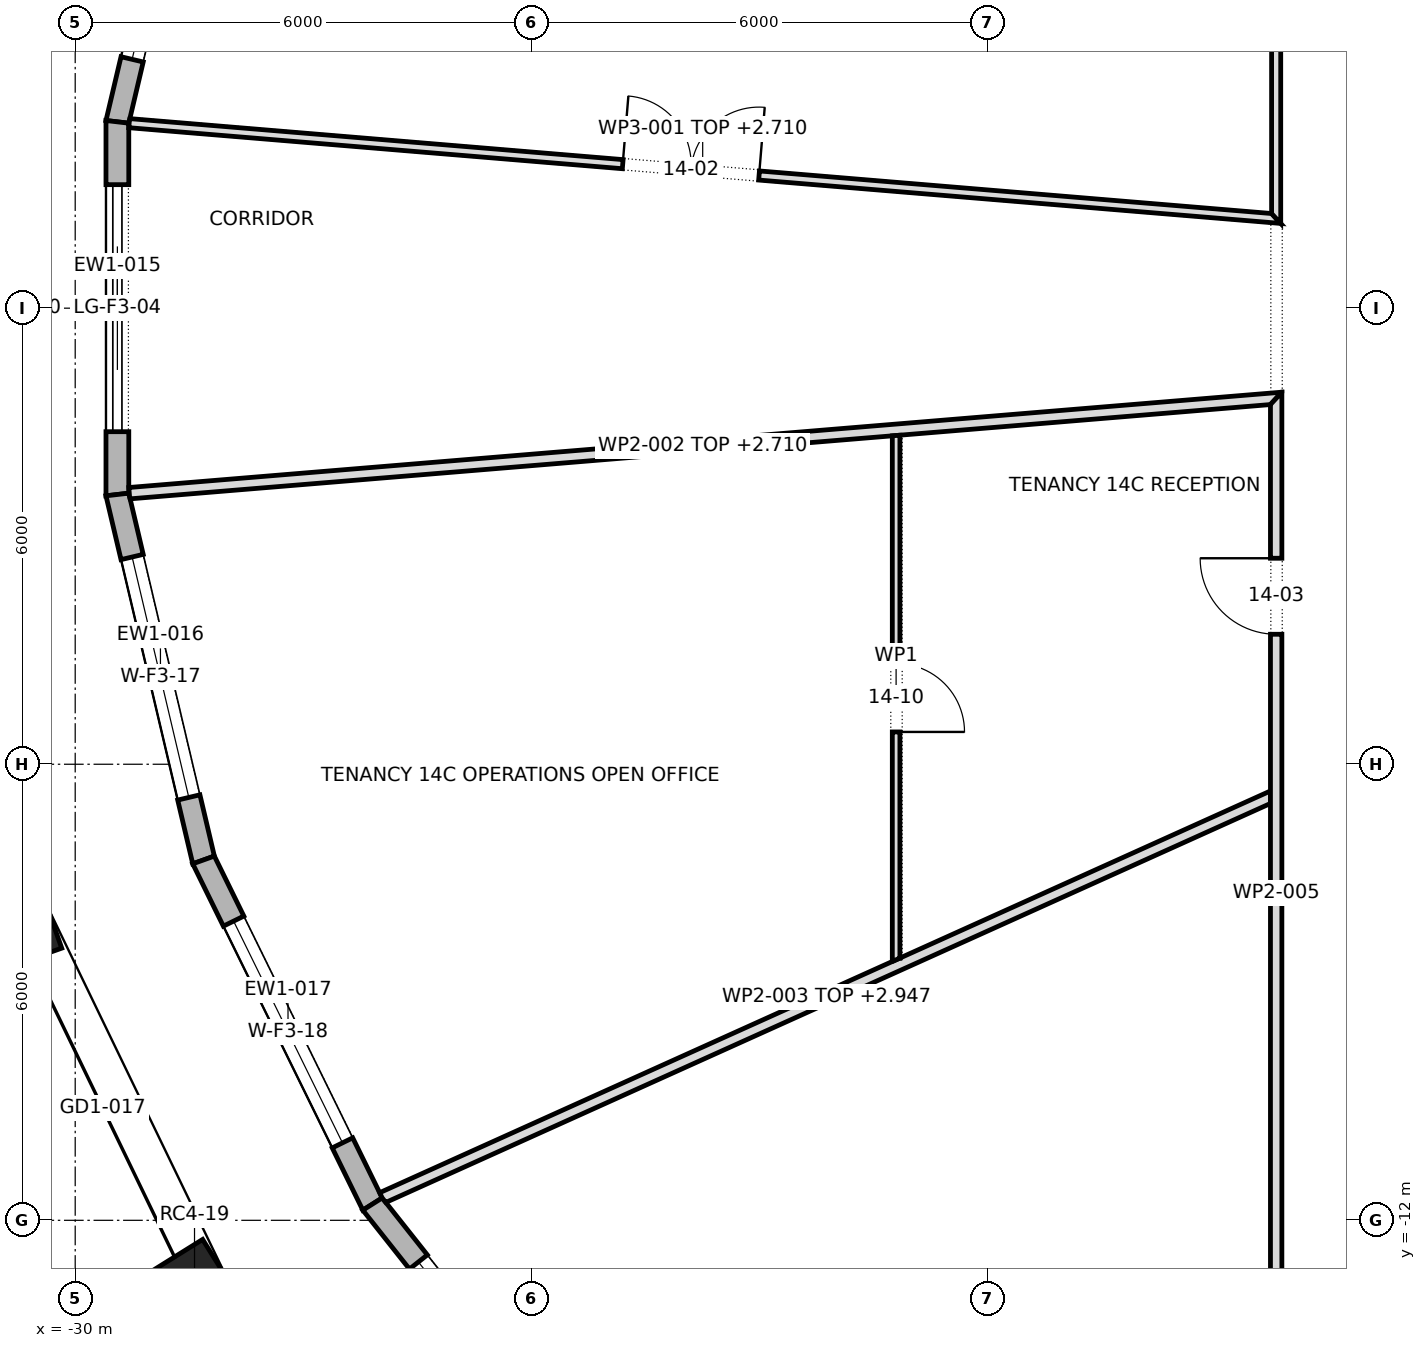
"""IFC4 building model, lengths in metres.
Left out: names, types, materials, properties, quantities, classifications, styles, units other than length and angle.
Written with IfcOpenShell. Run it as: python <this file> out.ifc"""

import sys

from ifc_helpers import new_model, si_unit, direction, frame, frame_2d, origin, origin_2d, place, context, subcontext, project, spatial, polyline, rectangle, outline, extrude, element, fill, save


model = new_model("IFC4")
c1 = context("Model", 3, precision=1e-05, world=origin(), true_north=direction((0.0, 1.0)))
c2 = subcontext(c1, "Body", "Model", "MODEL_VIEW")
j1 = project(units=[si_unit("LENGTHUNIT", "METRE"), si_unit("PLANEANGLEUNIT", "RADIAN")], contexts=[c1])
p1 = place(None, origin())
s1 = spatial("IfcSite", under=j1, at=p1, CompositionType="ELEMENT")
p2 = place(p1, origin())
s2 = spatial("IfcBuilding", under=s1, at=p2, CompositionType="ELEMENT")
p3 = place(p2, frame((0.0, 0.0, 202.9)))
s3 = spatial("IfcBuildingStorey", under=s2, at=p3, CompositionType="ELEMENT", Elevation=202.9)
for number, where, z_axis, x_axis in (
    (1, (-30.849, -8.021, 0.0), (0.0, 0.0, 1.0), (0.334, -0.943, 0.0)),
    (2, (-28.43, -13.025, 0.0), (0.0, 0.0, 1.0), (0.529, -0.849, 0.0)),
):
    element("IfcColumn", number, at=place(p3, frame(where, z_axis=z_axis, x_axis=x_axis)), inside=s3, PredefinedType="COLUMN", context=c2, shape_type="SweptSolid", body=[
        extrude(rectangle(XDim=1.2, YDim=1.0, at=origin_2d()), origin(), (0.0, 0.0, 1.0), 4.0),
    ])
p4 = place(p3, frame((-28.311, 7.259, 0.0), z_axis=(0.0, 0.0, 1.0), x_axis=(-0.229535186351, -0.973300363828, 0.0)))
e3 = element("IfcWall", 3, at=p4, inside=s3, PredefinedType="STANDARD", context=c2, shape_type="SweptSolid", body=[
    extrude(outline(polyline([(-0.017, -0.15), (4.957, -0.15), (4.922, 0.15), (0.017, 0.15), (-0.017, -0.15)])), origin(), (0.0, 0.0, 1.0), 3.7),
])
p5 = place(p4, frame((0.845, 0.0, 0.6)))
e4 = element("IfcOpeningElement", 4, at=p5, cuts=e3, PredefinedType="OPENING", context=c2, shape_type="SweptSolid", body=[
    extrude(rectangle(XDim=3.25, YDim=2.65, at=frame_2d((1.625, 1.325))), frame((0.0, 0.162, 0.0), z_axis=(0.0, -1.0, 0.0), x_axis=(1.0, 0.0, 0.0)), (0.0, 0.0, 1.0), 0.324),
])
p6 = place(p3, frame((-29.445, 2.451, 0.0), z_axis=(0.0, 0.0, 1.0), x_axis=(0.0, -1.0, 0.0)))
e5 = element("IfcWall", 5, at=p6, inside=s3, PredefinedType="STANDARD", context=c2, shape_type="SweptSolid", body=[
    extrude(outline(polyline([(-0.017, -0.15), (4.92, -0.15), (4.885, 0.15), (0.017, 0.15), (-0.017, -0.15)])), origin(), (0.0, 0.0, 1.0), 3.7),
])
p7 = place(p6, frame((0.826, 0.0, 0.0)))
e6 = element("IfcOpeningElement", 6, at=p7, cuts=e5, PredefinedType="OPENING", context=c2, shape_type="SweptSolid", body=[
    extrude(rectangle(XDim=3.25, YDim=3.25, at=frame_2d((1.625, 1.625))), frame((0.0, 0.162, 0.0), z_axis=(0.0, -1.0, 0.0), x_axis=(1.0, 0.0, 0.0)), (0.0, 0.0, 1.0), 0.324),
])
p8 = place(p3, frame((-29.445, -2.451, 0.0), z_axis=(0.0, 0.0, 1.0), x_axis=(0.229535186351, -0.973300363828, 0.0)))
e7 = element("IfcWall", 7, at=p8, inside=s3, PredefinedType="STANDARD", context=c2, shape_type="SweptSolid", body=[
    extrude(outline(polyline([(-0.017, -0.15), (4.956, -0.15), (4.923, 0.15), (0.017, 0.15), (-0.017, -0.15)])), origin(), (0.0, 0.0, 1.0), 3.7),
])
p9 = place(p8, frame((0.845, 0.0, 0.6)))
e8 = element("IfcOpeningElement", 8, at=p9, cuts=e7, PredefinedType="OPENING", context=c2, shape_type="SweptSolid", body=[
    extrude(rectangle(XDim=3.25, YDim=2.65, at=frame_2d((1.625, 1.325))), frame((0.0, 0.162, 0.0), z_axis=(0.0, -1.0, 0.0), x_axis=(1.0, 0.0, 0.0)), (0.0, 0.0, 1.0), 0.324),
])
p10 = place(p3, frame((-28.311, -7.259, 0.0), z_axis=(0.0, 0.0, 1.0), x_axis=(0.440773193145, -0.89761851151, 0.0)))
e9 = element("IfcWall", 9, at=p10, inside=s3, PredefinedType="STANDARD", context=c2, shape_type="SweptSolid", body=[
    extrude(outline(polyline([(-0.017, -0.15), (5.059, -0.15), (5.027, 0.15), (0.017, 0.15), (-0.017, -0.15)])), origin(), (0.0, 0.0, 1.0), 3.7),
])
p11 = place(p10, frame((0.896, 0.0, 0.6)))
e10 = element("IfcOpeningElement", 10, at=p11, cuts=e9, PredefinedType="OPENING", context=c2, shape_type="SweptSolid", body=[
    extrude(rectangle(XDim=3.25, YDim=2.65, at=frame_2d((1.625, 1.325))), frame((0.0, 0.162, 0.0), z_axis=(0.0, -1.0, 0.0), x_axis=(1.0, 0.0, 0.0)), (0.0, 0.0, 1.0), 0.324),
])
p12 = place(p3, frame((-26.088, -11.786, 0.0), z_axis=(0.0, 0.0, 1.0), x_axis=(0.620870264345, -0.783913333763, 0.0)))
e11 = element("IfcWall", 11, at=p12, inside=s3, PredefinedType="STANDARD", context=c2, shape_type="SweptSolid", body=[
    extrude(outline(polyline([(-0.016, -0.15), (5.21, -0.15), (5.179, 0.15), (0.016, 0.15), (-0.016, -0.15)])), origin(), (0.0, 0.0, 1.0), 3.7),
])
p13 = place(p12, frame((0.972, 0.0, 0.6)))
e12 = element("IfcOpeningElement", 12, at=p13, cuts=e11, PredefinedType="OPENING", context=c2, shape_type="SweptSolid", body=[
    extrude(rectangle(XDim=3.25, YDim=2.65, at=frame_2d((1.625, 1.325))), frame((0.0, 0.162, 0.0), z_axis=(0.0, -1.0, 0.0), x_axis=(1.0, 0.0, 0.0)), (0.0, 0.0, 1.0), 0.324),
])
p14 = place(p3, frame((-29.29, 2.434, 0.0), z_axis=(0.0, 0.0, 1.0), x_axis=(0.996564113419, -0.082824922852, 0.0)))
e13 = element("IfcWall", 13, at=p14, inside=s3, PredefinedType="PARTITIONING", context=c2, shape_type="SweptSolid", body=[
    extrude(outline(polyline([(15.207, -0.06), (15.207, -0.06), (15.207, -0.06), (15.207, -0.06), (15.142, 0.0), (15.077, 0.06), (13.192, 0.06), (11.308, 0.06), (9.424, 0.06), (7.54, 0.06), (5.656, 0.06), (3.772, 0.06), (1.888, 0.06), (0.004, 0.06), (0.0, 0.035), (0.0, -0.06), (1.901, -0.06), (3.802, -0.06), (5.703, -0.06), (7.604, -0.06), (9.504, -0.06), (11.405, -0.06), (13.306, -0.06), (15.207, -0.06)])), origin(), (0.0, 0.0, 1.0), 2.71),
])
p15 = place(p14, frame((6.515, 0.0, 0.0)))
e14 = element("IfcOpeningElement", 14, at=p15, cuts=e13, PredefinedType="OPENING", context=c2, shape_type="SweptSolid", body=[
    extrude(rectangle(XDim=1.8, YDim=2.1, at=frame_2d((0.9, 1.05))), frame((0.0, 0.072, 0.0), z_axis=(0.0, -1.0, 0.0), x_axis=(1.0, 0.0, 0.0)), (0.0, 0.0, 1.0), 0.144),
])
p16 = place(p3, frame((-29.288, -2.434, 0.0), z_axis=(0.0, 0.0, 1.0), x_axis=(0.9965984313, 0.082410962436, 0.0)))
e15 = element("IfcWall", 15, at=p16, inside=s3, PredefinedType="PARTITIONING", context=c2, shape_type="SweptSolid", body=[
    extrude(outline(polyline([(0.005, -0.075), (1.886, -0.075), (3.768, -0.075), (5.65, -0.075), (7.531, -0.075), (9.413, -0.075), (11.295, -0.075), (13.177, -0.075), (15.059, -0.075), (15.221, 0.075), (15.221, 0.075), (13.319, 0.075), (11.416, 0.075), (9.513, 0.075), (7.611, 0.075), (5.708, 0.075), (3.805, 0.075), (1.903, 0.075), (0.0, 0.075), (0.0, -0.044), (0.005, -0.075)])), origin(), (0.0, 0.0, 1.0), 2.71),
])
p17 = place(p3, frame((-25.963, -11.705, 0.0), z_axis=(0.0, 0.0, 1.0), x_axis=(0.911586477794, 0.41110837197, 0.0)))
e16 = element("IfcWall", 16, at=p17, inside=s3, PredefinedType="PARTITIONING", context=c2, shape_type="SweptSolid", body=[
    extrude(outline(polyline([(0.021, -0.075), (1.844, -0.075), (3.668, -0.075), (5.492, -0.075), (7.316, -0.075), (9.14, -0.075), (10.964, -0.075), (12.788, -0.075), (12.856, 0.075), (11.073, 0.075), (9.291, 0.075), (7.508, 0.075), (7.507, 0.073), (7.502, 0.075), (5.627, 0.075), (3.751, 0.075), (1.875, 0.075), (0.0, 0.075), (0.0, 0.062), (0.002, -0.001), (0.021, -0.075)])), origin(), (0.0, 0.0, 1.0), 2.947),
])
p18 = place(p3, frame((-19.2, -8.595, 0.0), z_axis=(0.0, 0.0, 1.0), x_axis=(0.0, 1.0, 0.0)))
e17 = element("IfcWall", 17, at=p18, inside=s3, PredefinedType="PARTITIONING", context=c2, shape_type="SweptSolid", body=[
    extrude(outline(polyline([(6.924, -0.05), (6.924, -0.047), (6.916, 0.05), (5.187, 0.05), (3.458, 0.05), (1.729, 0.05), (0.0, 0.05), (0.0, 0.05), (0.045, -0.05), (1.765, -0.05), (3.484, -0.05), (5.204, -0.05), (6.924, -0.05)])), origin(), (0.0, 0.0, 1.0), 3.7),
])
p19 = place(p18, frame((3.02, 0.0, 0.0)))
e18 = element("IfcOpeningElement", 18, at=p19, cuts=e17, PredefinedType="OPENING", context=c2, shape_type="SweptSolid", body=[
    extrude(rectangle(XDim=0.9, YDim=2.1, at=frame_2d((0.45, 1.05))), frame((0.0, 0.062, 0.0), z_axis=(0.0, -1.0, 0.0), x_axis=(1.0, 0.0, 0.0)), (0.0, 0.0, 1.0), 0.124),
])
p20 = place(p3, frame((-14.2, -14.275, 0.0), z_axis=(0.0, 0.0, 1.0), x_axis=(0.0, 1.0, 0.0)))
e19 = element("IfcWall", 19, at=p20, inside=s3, PredefinedType="PARTITIONING", context=c2, shape_type="SweptSolid", body=[
    extrude(outline(polyline([(0.15, -0.075), (2.01, -0.075), (3.87, -0.075), (5.73, -0.075), (7.59, -0.075), (9.45, -0.075), (11.31, -0.075), (13.17, -0.075), (13.007, 0.075), (11.149, 0.075), (9.291, 0.075), (7.433, 0.075), (5.574, 0.075), (3.716, 0.075), (1.858, 0.075), (0.0, 0.075), (0.15, -0.075)])), origin(), (0.0, 0.0, 1.0), 3.7),
])
p21 = place(p20, frame((9.985, 0.0, 0.0)))
e20 = element("IfcOpeningElement", 20, at=p21, cuts=e19, PredefinedType="OPENING", context=c2, shape_type="SweptSolid", body=[
    extrude(rectangle(XDim=1.0, YDim=2.1, at=frame_2d((0.5, 1.05))), frame((0.0, 0.087, 0.0), z_axis=(0.0, -1.0, 0.0), x_axis=(1.0, 0.0, 0.0)), (0.0, 0.0, 1.0), 0.174),
])
p22 = place(p3, frame((-14.2, 1.115, 0.0), z_axis=(0.0, 0.0, 1.0), x_axis=(0.0, 1.0, 0.0)))
e21 = element("IfcWall", 21, at=p22, inside=s3, PredefinedType="PARTITIONING", context=c2, shape_type="SweptSolid", body=[
    extrude(outline(polyline([(0.0, -0.06), (1.861, -0.06), (3.721, -0.06), (5.582, -0.06), (7.443, -0.06), (9.304, -0.06), (11.164, -0.06), (13.025, -0.06), (13.145, 0.06), (11.286, 0.06), (9.427, 0.06), (7.567, 0.06), (5.708, 0.06), (3.849, 0.06), (1.99, 0.06), (0.13, 0.06), (0.0, -0.06), (0.0, -0.06)])), origin(), (0.0, 0.0, 1.0), 3.7),
])
p23 = place(p5, origin())
e22 = element("IfcWindow", 22, at=p23, inside=s3, PartitioningType="TRIPLE_PANEL_VERTICAL", PredefinedType="WINDOW", context=c2, shape_type="SweptSolid", body=[
    extrude(rectangle(XDim=3.25, YDim=2.65, at=frame_2d((1.625, 1.325))), frame((0.0, 0.03, 0.0), z_axis=(0.0, -1.0, 0.0), x_axis=(1.0, 0.0, 0.0)), (0.0, 0.0, 1.0), 0.06),
])
fill(e4, e22)
p24 = place(p7, origin())
e23 = element("IfcDoor", 23, at=p24, inside=s3, OperationType="DOUBLE_DOOR_SLIDING", PredefinedType="DOOR", context=c2, shape_type="SweptSolid", body=[
    extrude(rectangle(XDim=3.25, YDim=3.25, at=frame_2d((1.625, 1.625))), frame((0.0, 0.025, 0.0), z_axis=(0.0, -1.0, 0.0), x_axis=(1.0, 0.0, 0.0)), (0.0, 0.0, 1.0), 0.05),
])
fill(e6, e23)
p25 = place(p9, origin())
e24 = element("IfcWindow", 24, at=p25, inside=s3, PartitioningType="TRIPLE_PANEL_VERTICAL", PredefinedType="WINDOW", context=c2, shape_type="SweptSolid", body=[
    extrude(rectangle(XDim=3.25, YDim=2.65, at=frame_2d((1.625, 1.325))), frame((0.0, 0.03, 0.0), z_axis=(0.0, -1.0, 0.0), x_axis=(1.0, 0.0, 0.0)), (0.0, 0.0, 1.0), 0.06),
])
fill(e8, e24)
p26 = place(p11, origin())
e25 = element("IfcWindow", 25, at=p26, inside=s3, PartitioningType="TRIPLE_PANEL_VERTICAL", PredefinedType="WINDOW", context=c2, shape_type="SweptSolid", body=[
    extrude(rectangle(XDim=3.25, YDim=2.65, at=frame_2d((1.625, 1.325))), frame((0.0, 0.03, 0.0), z_axis=(0.0, -1.0, 0.0), x_axis=(1.0, 0.0, 0.0)), (0.0, 0.0, 1.0), 0.06),
])
fill(e10, e25)
p27 = place(p13, origin())
e26 = element("IfcWindow", 26, at=p27, inside=s3, PartitioningType="TRIPLE_PANEL_VERTICAL", PredefinedType="WINDOW", context=c2, shape_type="SweptSolid", body=[
    extrude(rectangle(XDim=3.25, YDim=2.65, at=frame_2d((1.625, 1.325))), frame((0.0, 0.03, 0.0), z_axis=(0.0, -1.0, 0.0), x_axis=(1.0, 0.0, 0.0)), (0.0, 0.0, 1.0), 0.06),
])
fill(e12, e26)
p28 = place(p15, origin())
e27 = element("IfcDoor", 27, at=p28, inside=s3, OperationType="DOUBLE_DOOR_SINGLE_SWING", PredefinedType="DOOR", context=c2, shape_type="SweptSolid", body=[
    extrude(rectangle(XDim=1.8, YDim=2.1, at=frame_2d((0.9, 1.05))), frame((0.0, 0.025, 0.0), z_axis=(0.0, -1.0, 0.0), x_axis=(1.0, 0.0, 0.0)), (0.0, 0.0, 1.0), 0.05),
])
fill(e14, e27)
p29 = place(p21, origin())
e28 = element("IfcDoor", 28, at=p29, inside=s3, OperationType="SINGLE_SWING_LEFT", PredefinedType="DOOR", context=c2, shape_type="SweptSolid", body=[
    extrude(rectangle(XDim=1.0, YDim=2.1, at=frame_2d((0.5, 1.05))), frame((0.0, 0.025, 0.0), z_axis=(0.0, -1.0, 0.0), x_axis=(1.0, 0.0, 0.0)), (0.0, 0.0, 1.0), 0.05),
])
fill(e20, e28)
p30 = place(p19, frame((0.9, 0.0, 0.0), z_axis=(0.0, 0.0, 1.0), x_axis=(-1.0, 0.0, 0.0)))
e29 = element("IfcDoor", 29, at=p30, inside=s3, OperationType="SINGLE_SWING_LEFT", PredefinedType="DOOR", context=c2, shape_type="SweptSolid", body=[
    extrude(rectangle(XDim=0.9, YDim=2.1, at=frame_2d((0.45, 1.05))), frame((0.0, 0.025, 0.0), z_axis=(0.0, -1.0, 0.0), x_axis=(1.0, 0.0, 0.0)), (0.0, 0.0, 1.0), 0.05),
])
fill(e18, e29)
save(model, sys.argv[1])
